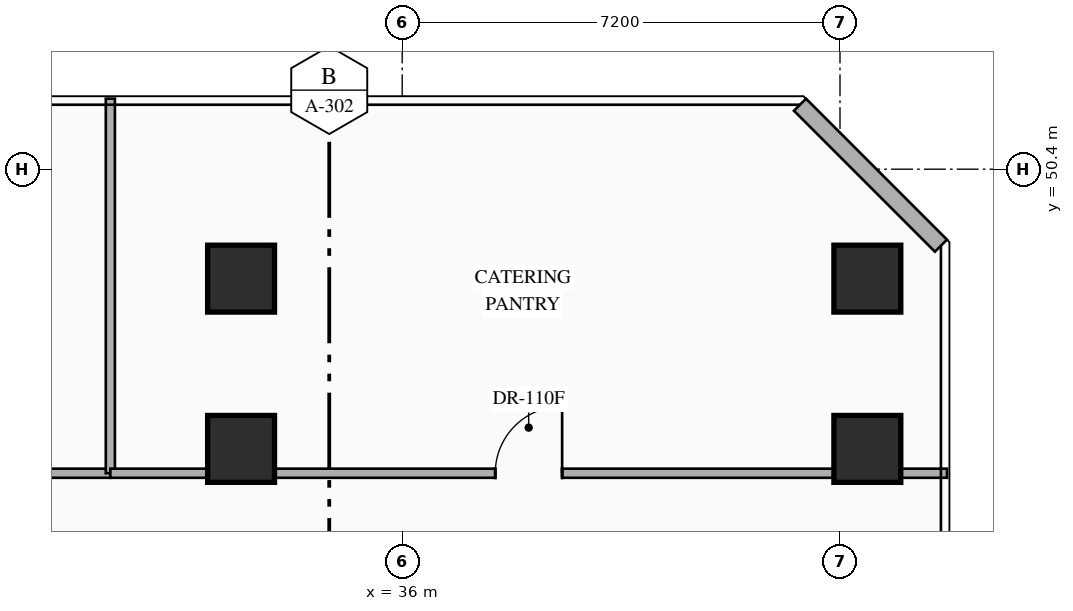
"""IFC4 building model, lengths in metres.
Left out: names, types, materials, properties, quantities, classifications, styles, units other than length and angle.
Written with IfcOpenShell. Run it as: python <this file> out.ifc"""

import sys

from ifc_helpers import new_model, si_unit, direction, frame, frame_2d, origin, origin_2d, place, context, subcontext, project, spatial, rectangle, hollow_rectangle, extrude, element, fill, save


model = new_model("IFC4")
c1 = context("Model", 3, precision=1e-05, world=origin(), true_north=direction((0.0, 1.0)))
c2 = subcontext(c1, "Body", "Model", "MODEL_VIEW")
j1 = project(units=[si_unit("LENGTHUNIT", "METRE"), si_unit("PLANEANGLEUNIT", "RADIAN")], contexts=[c1])
p1 = place(None, origin())
s1 = spatial("IfcSite", under=j1, at=p1, CompositionType="ELEMENT")
p2 = place(p1, origin())
s2 = spatial("IfcBuilding", under=s1, at=p2, CompositionType="ELEMENT")
p3 = place(p2, frame((0.0, 0.0, 16.2)))
s3 = spatial("IfcBuildingStorey", under=s2, at=p3, CompositionType="ELEMENT", Elevation=16.2)
for number, where, z_axis, x_axis in (
    (1, (33.35, 45.8, 0.0), (0.0, 0.0, 1.0), (1.0, 0.0, 0.0)),
    (2, (43.65, 45.8, 0.0), (0.0, 0.0, 1.0), (1.0, 0.0, 0.0)),
    (3, (33.35, 48.6, 0.0), (0.0, 0.0, 1.0), (1.0, 0.0, 0.0)),
    (4, (43.65, 48.6, 0.0), (0.0, 0.0, 1.0), (1.0, 0.0, 0.0)),
):
    element("IfcColumn", number, at=place(p3, frame(where, z_axis=z_axis, x_axis=x_axis)), inside=s3, PredefinedType="COLUMN", context=c2, shape_type="SweptSolid", body=[
        extrude(hollow_rectangle(XDim=1.1, YDim=1.1, WallThickness=0.04, at=origin_2d()), origin(), (0.0, 0.0, 1.0), 5.4),
    ])
p4 = place(p3, frame((42.542, 51.46, 0.0), z_axis=(0.0, 0.0, 1.0), x_axis=(0.707144017911, -0.707069542501, 0.0)))
e5 = element("IfcWall", 5, at=p4, inside=s3, PredefinedType="STANDARD", context=c2, shape_type="SweptSolid", body=[
    extrude(rectangle(XDim=3.278, YDim=0.28, at=frame_2d((1.639, 0.0))), origin(), (0.0, 0.0, 1.0), 5.1),
])
p5 = place(p3, frame((21.9, 45.4, 0.0), z_axis=(0.0, 0.0, 1.0), x_axis=(1.0, 0.0, 0.0)))
e6 = element("IfcWall", 6, at=p5, inside=s3, PredefinedType="PARTITIONING", context=c2, shape_type="SweptSolid", body=[
    extrude(rectangle(XDim=9.3, YDim=0.15, at=frame_2d((4.65, 0.0))), origin(), (0.0, 0.0, 1.0), 5.1),
])
p6 = place(p5, frame((5.658, 0.0, 0.0)))
e7 = element("IfcOpeningElement", 7, at=p6, cuts=e6, PredefinedType="OPENING", context=c2, shape_type="SweptSolid", body=[
    extrude(rectangle(XDim=1.0, YDim=2.15, at=frame_2d((0.5, 1.075))), frame((0.0, 0.085, 0.0), z_axis=(0.0, -1.0, 0.0), x_axis=(1.0, 0.0, 0.0)), (0.0, 0.0, 1.0), 0.17),
])
p7 = place(p3, frame((31.2, 45.4, 0.0), z_axis=(0.0, 0.0, 1.0), x_axis=(0.0, 1.0, 0.0)))
e8 = element("IfcWall", 8, at=p7, inside=s3, PredefinedType="PARTITIONING", context=c2, shape_type="SweptSolid", body=[
    extrude(rectangle(XDim=6.16, YDim=0.15, at=frame_2d((3.08, 0.0))), origin(), (0.0, 0.0, 1.0), 5.1),
])
p8 = place(p3, frame((31.2, 45.4, 0.0), z_axis=(0.0, 0.0, 1.0), x_axis=(1.0, 0.0, 0.0)))
e9 = element("IfcWall", 9, at=p8, inside=s3, PredefinedType="PARTITIONING", context=c2, shape_type="SweptSolid", body=[
    extrude(rectangle(XDim=13.76, YDim=0.15, at=frame_2d((6.88, 0.0))), origin(), (0.0, 0.0, 1.0), 5.1),
])
p9 = place(p8, frame((6.33, 0.0, 0.0)))
e10 = element("IfcOpeningElement", 10, at=p9, cuts=e9, PredefinedType="OPENING", context=c2, shape_type="SweptSolid", body=[
    extrude(rectangle(XDim=1.1, YDim=2.24, at=frame_2d((0.55, 1.12))), frame((0.0, 0.085, 0.0), z_axis=(0.0, -1.0, 0.0), x_axis=(1.0, 0.0, 0.0)), (0.0, 0.0, 1.0), 0.17),
])
p10 = place(p9, origin())
e11 = element("IfcDoor", 11, at=p10, inside=s3, OperationType="SINGLE_SWING_RIGHT", PredefinedType="DOOR", context=c2, shape_type="SweptSolid", body=[
    extrude(rectangle(XDim=1.1, YDim=2.24, at=frame_2d((0.55, 1.12))), frame((0.0, 0.025, 0.0), z_axis=(0.0, -1.0, 0.0), x_axis=(1.0, 0.0, 0.0)), (0.0, 0.0, 1.0), 0.05),
])
fill(e10, e11)
save(model, sys.argv[1])
